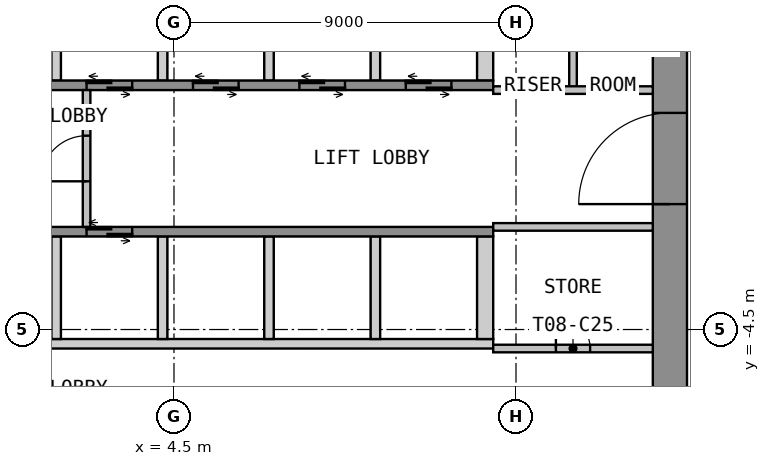
"""IFC4 building model, lengths in metres.
Left out: names, types, materials, properties, quantities, classifications, styles, units other than length and angle.
Written with IfcOpenShell. Run it as: python <this file> out.ifc"""

import sys

from ifc_helpers import new_model, si_unit, direction, frame, frame_2d, origin, place, context, subcontext, project, spatial, polyline, rectangle, outline, extrude, element, fill, save


model = new_model("IFC4")
c1 = context("Model", 3, precision=1e-05, world=origin(), true_north=direction((0.0, 1.0)))
c2 = subcontext(c1, "Body", "Model", "MODEL_VIEW")
j1 = project(units=[si_unit("LENGTHUNIT", "METRE"), si_unit("PLANEANGLEUNIT", "RADIAN")], contexts=[c1])
p1 = place(None, origin())
s1 = spatial("IfcSite", under=j1, at=p1, CompositionType="ELEMENT")
p2 = place(p1, origin())
s2 = spatial("IfcBuilding", under=s1, at=p2, CompositionType="ELEMENT")
p3 = place(p2, frame((0.0, 0.0, 116.4)))
s3 = spatial("IfcBuildingStorey", under=s2, at=p3, CompositionType="ELEMENT", Elevation=116.4)
p4 = place(p3, frame((17.55, -12.6, 0.0), z_axis=(0.0, 0.0, 1.0), x_axis=(0.0, 1.0, 0.0)))
e1 = element("IfcWall", 1, at=p4, inside=s3, PredefinedType="SHEAR", context=c2, shape_type="SweptSolid", body=[
    extrude(rectangle(XDim=25.2, YDim=0.9, at=frame_2d((12.6, 0.0))), origin(), (0.0, 0.0, 1.0), 3.525),
])
p5 = place(p4, frame((11.4, 0.0, 0.0)))
e2 = element("IfcOpeningElement", 2, at=p5, cuts=e1, PredefinedType="OPENING", context=c2, shape_type="SweptSolid", body=[
    extrude(rectangle(XDim=2.4, YDim=2.1, at=frame_2d((1.2, 1.05))), frame((0.0, 0.46, 0.0), z_axis=(0.0, -1.0, 0.0), x_axis=(1.0, 0.0, 0.0)), (0.0, 0.0, 1.0), 0.92),
])
p6 = place(p3, origin())
e3 = element("IfcWall", 3, at=p6, inside=s3, PredefinedType="SHEAR", context=c2, shape_type="SweptSolid", body=[
    extrude(outline(polyline([(1.275, 2.05), (1.525, 2.05), (1.525, 4.75), (1.275, 4.75), (1.275, 2.05)])), origin(), (0.0, 0.0, 1.0), 3.525),
])
p7 = place(p3, origin())
e4 = element("IfcWall", 4, at=p7, inside=s3, PredefinedType="SHEAR", context=c2, shape_type="SweptSolid", body=[
    extrude(outline(polyline([(4.075, 2.05), (4.325, 2.05), (4.325, 4.75), (4.075, 4.75), (4.075, 2.05)])), origin(), (0.0, 0.0, 1.0), 3.525),
])
p8 = place(p3, origin())
e5 = element("IfcWall", 5, at=p8, inside=s3, PredefinedType="SHEAR", context=c2, shape_type="SweptSolid", body=[
    extrude(outline(polyline([(6.875, 2.05), (7.125, 2.05), (7.125, 4.75), (6.875, 4.75), (6.875, 2.05)])), origin(), (0.0, 0.0, 1.0), 3.525),
])
p9 = place(p3, origin())
e6 = element("IfcWall", 6, at=p9, inside=s3, PredefinedType="SHEAR", context=c2, shape_type="SweptSolid", body=[
    extrude(outline(polyline([(9.675, 2.05), (9.925, 2.05), (9.925, 4.75), (9.675, 4.75), (9.675, 2.05)])), origin(), (0.0, 0.0, 1.0), 3.525),
])
p10 = place(p3, origin())
e7 = element("IfcWall", 7, at=p10, inside=s3, PredefinedType="SHEAR", context=c2, shape_type="SweptSolid", body=[
    extrude(outline(polyline([(12.475, 2.05), (12.9, 2.05), (12.9, 4.75), (12.475, 4.75), (12.475, 2.05)])), origin(), (0.0, 0.0, 1.0), 3.525),
])
p11 = place(p3, frame((-12.9, 1.925, 0.0), z_axis=(0.0, 0.0, 1.0), x_axis=(1.0, 0.0, 0.0)))
e8 = element("IfcWall", 8, at=p11, inside=s3, PredefinedType="SHEAR", context=c2, shape_type="SweptSolid", body=[
    extrude(rectangle(XDim=25.8, YDim=0.25, at=frame_2d((12.9, 0.0))), origin(), (0.0, 0.0, 1.0), 3.525),
])
p12 = place(p11, frame((9.5, 0.0, 0.0)))
e9 = element("IfcOpeningElement", 9, at=p12, cuts=e8, PredefinedType="OPENING", context=c2, shape_type="SweptSolid", body=[
    extrude(rectangle(XDim=1.2, YDim=2.1, at=frame_2d((0.6, 1.05))), frame((0.0, 0.135, 0.0), z_axis=(0.0, -1.0, 0.0), x_axis=(1.0, 0.0, 0.0)), (0.0, 0.0, 1.0), 0.27),
])
p13 = place(p11, frame((12.3, 0.0, 0.0)))
e10 = element("IfcOpeningElement", 10, at=p13, cuts=e8, PredefinedType="OPENING", context=c2, shape_type="SweptSolid", body=[
    extrude(rectangle(XDim=1.2, YDim=2.1, at=frame_2d((0.6, 1.05))), frame((0.0, 0.135, 0.0), z_axis=(0.0, -1.0, 0.0), x_axis=(1.0, 0.0, 0.0)), (0.0, 0.0, 1.0), 0.27),
])
p14 = place(p11, frame((15.1, 0.0, 0.0)))
e11 = element("IfcOpeningElement", 11, at=p14, cuts=e8, PredefinedType="OPENING", context=c2, shape_type="SweptSolid", body=[
    extrude(rectangle(XDim=1.2, YDim=2.1, at=frame_2d((0.6, 1.05))), frame((0.0, 0.135, 0.0), z_axis=(0.0, -1.0, 0.0), x_axis=(1.0, 0.0, 0.0)), (0.0, 0.0, 1.0), 0.27),
])
p15 = place(p11, frame((17.9, 0.0, 0.0)))
e12 = element("IfcOpeningElement", 12, at=p15, cuts=e8, PredefinedType="OPENING", context=c2, shape_type="SweptSolid", body=[
    extrude(rectangle(XDim=1.2, YDim=2.1, at=frame_2d((0.6, 1.05))), frame((0.0, 0.135, 0.0), z_axis=(0.0, -1.0, 0.0), x_axis=(1.0, 0.0, 0.0)), (0.0, 0.0, 1.0), 0.27),
])
p16 = place(p11, frame((20.7, 0.0, 0.0)))
e13 = element("IfcOpeningElement", 13, at=p16, cuts=e8, PredefinedType="OPENING", context=c2, shape_type="SweptSolid", body=[
    extrude(rectangle(XDim=1.2, YDim=2.1, at=frame_2d((0.6, 1.05))), frame((0.0, 0.135, 0.0), z_axis=(0.0, -1.0, 0.0), x_axis=(1.0, 0.0, 0.0)), (0.0, 0.0, 1.0), 0.27),
])
p17 = place(p11, frame((23.5, 0.0, 0.0)))
e14 = element("IfcOpeningElement", 14, at=p17, cuts=e8, PredefinedType="OPENING", context=c2, shape_type="SweptSolid", body=[
    extrude(rectangle(XDim=1.2, YDim=2.1, at=frame_2d((0.6, 1.05))), frame((0.0, 0.135, 0.0), z_axis=(0.0, -1.0, 0.0), x_axis=(1.0, 0.0, 0.0)), (0.0, 0.0, 1.0), 0.27),
])
p18 = place(p3, origin())
e15 = element("IfcWall", 15, at=p18, inside=s3, PredefinedType="SHEAR", context=c2, shape_type="SweptSolid", body=[
    extrude(outline(polyline([(-12.9, -5.0), (12.9, -5.0), (12.9, -4.75), (-12.9, -4.75), (-12.9, -5.0)])), origin(), (0.0, 0.0, 1.0), 3.525),
])
p19 = place(p3, origin())
e16 = element("IfcWall", 16, at=p19, inside=s3, PredefinedType="SHEAR", context=c2, shape_type="SweptSolid", body=[
    extrude(outline(polyline([(1.275, -4.75), (1.525, -4.75), (1.525, -2.05), (1.275, -2.05), (1.275, -4.75)])), origin(), (0.0, 0.0, 1.0), 3.525),
])
p20 = place(p3, origin())
e17 = element("IfcWall", 17, at=p20, inside=s3, PredefinedType="SHEAR", context=c2, shape_type="SweptSolid", body=[
    extrude(outline(polyline([(4.075, -4.75), (4.325, -4.75), (4.325, -2.05), (4.075, -2.05), (4.075, -4.75)])), origin(), (0.0, 0.0, 1.0), 3.525),
])
p21 = place(p3, origin())
e18 = element("IfcWall", 18, at=p21, inside=s3, PredefinedType="SHEAR", context=c2, shape_type="SweptSolid", body=[
    extrude(outline(polyline([(6.875, -4.75), (7.125, -4.75), (7.125, -2.05), (6.875, -2.05), (6.875, -4.75)])), origin(), (0.0, 0.0, 1.0), 3.525),
])
p22 = place(p3, origin())
e19 = element("IfcWall", 19, at=p22, inside=s3, PredefinedType="SHEAR", context=c2, shape_type="SweptSolid", body=[
    extrude(outline(polyline([(9.675, -4.75), (9.925, -4.75), (9.925, -2.05), (9.675, -2.05), (9.675, -4.75)])), origin(), (0.0, 0.0, 1.0), 3.525),
])
p23 = place(p3, origin())
e20 = element("IfcWall", 20, at=p23, inside=s3, PredefinedType="SHEAR", context=c2, shape_type="SweptSolid", body=[
    extrude(outline(polyline([(12.475, -4.75), (12.9, -4.75), (12.9, -2.05), (12.475, -2.05), (12.475, -4.75)])), origin(), (0.0, 0.0, 1.0), 3.525),
])
p24 = place(p3, frame((-12.9, -1.925, 0.0), z_axis=(0.0, 0.0, 1.0), x_axis=(1.0, 0.0, 0.0)))
e21 = element("IfcWall", 21, at=p24, inside=s3, PredefinedType="SHEAR", context=c2, shape_type="SweptSolid", body=[
    extrude(rectangle(XDim=25.8, YDim=0.25, at=frame_2d((12.9, 0.0))), origin(), (0.0, 0.0, 1.0), 3.525),
])
p25 = place(p24, frame((1.1, 0.0, 0.0)))
e22 = element("IfcOpeningElement", 22, at=p25, cuts=e21, PredefinedType="OPENING", context=c2, shape_type="SweptSolid", body=[
    extrude(rectangle(XDim=1.2, YDim=2.1, at=frame_2d((0.6, 1.05))), frame((0.0, 0.135, 0.0), z_axis=(0.0, -1.0, 0.0), x_axis=(1.0, 0.0, 0.0)), (0.0, 0.0, 1.0), 0.27),
])
p26 = place(p24, frame((3.9, 0.0, 0.0)))
e23 = element("IfcOpeningElement", 23, at=p26, cuts=e21, PredefinedType="OPENING", context=c2, shape_type="SweptSolid", body=[
    extrude(rectangle(XDim=1.2, YDim=2.1, at=frame_2d((0.6, 1.05))), frame((0.0, 0.135, 0.0), z_axis=(0.0, -1.0, 0.0), x_axis=(1.0, 0.0, 0.0)), (0.0, 0.0, 1.0), 0.27),
])
p27 = place(p24, frame((6.7, 0.0, 0.0)))
e24 = element("IfcOpeningElement", 24, at=p27, cuts=e21, PredefinedType="OPENING", context=c2, shape_type="SweptSolid", body=[
    extrude(rectangle(XDim=1.2, YDim=2.1, at=frame_2d((0.6, 1.05))), frame((0.0, 0.135, 0.0), z_axis=(0.0, -1.0, 0.0), x_axis=(1.0, 0.0, 0.0)), (0.0, 0.0, 1.0), 0.27),
])
p28 = place(p24, frame((9.5, 0.0, 0.0)))
e25 = element("IfcOpeningElement", 25, at=p28, cuts=e21, PredefinedType="OPENING", context=c2, shape_type="SweptSolid", body=[
    extrude(rectangle(XDim=1.2, YDim=2.1, at=frame_2d((0.6, 1.05))), frame((0.0, 0.135, 0.0), z_axis=(0.0, -1.0, 0.0), x_axis=(1.0, 0.0, 0.0)), (0.0, 0.0, 1.0), 0.27),
])
p29 = place(p24, frame((12.3, 0.0, 0.0)))
e26 = element("IfcOpeningElement", 26, at=p29, cuts=e21, PredefinedType="OPENING", context=c2, shape_type="SweptSolid", body=[
    extrude(rectangle(XDim=1.2, YDim=2.1, at=frame_2d((0.6, 1.05))), frame((0.0, 0.135, 0.0), z_axis=(0.0, -1.0, 0.0), x_axis=(1.0, 0.0, 0.0)), (0.0, 0.0, 1.0), 0.27),
])
p30 = place(p24, frame((15.1, 0.0, 0.0)))
e27 = element("IfcOpeningElement", 27, at=p30, cuts=e21, PredefinedType="OPENING", context=c2, shape_type="SweptSolid", body=[
    extrude(rectangle(XDim=1.2, YDim=2.1, at=frame_2d((0.6, 1.05))), frame((0.0, 0.135, 0.0), z_axis=(0.0, -1.0, 0.0), x_axis=(1.0, 0.0, 0.0)), (0.0, 0.0, 1.0), 0.27),
])
p31 = place(p3, frame((2.2, -1.8, 0.0), z_axis=(0.0, 0.0, 1.0), x_axis=(0.0, 1.0, 0.0)))
e28 = element("IfcWall", 28, at=p31, inside=s3, PredefinedType="PARTITIONING", context=c2, shape_type="SweptSolid", body=[
    extrude(rectangle(XDim=3.6, YDim=0.2, at=frame_2d((1.8, 0.0))), origin(), (0.0, 0.0, 1.0), 3.525),
])
p32 = place(p31, frame((1.2, 0.0, 0.0)))
e29 = element("IfcOpeningElement", 29, at=p32, cuts=e28, PredefinedType="OPENING", context=c2, shape_type="SweptSolid", body=[
    extrude(rectangle(XDim=1.2, YDim=2.1, at=frame_2d((0.6, 1.05))), frame((0.0, 0.11, 0.0), z_axis=(0.0, -1.0, 0.0), x_axis=(1.0, 0.0, 0.0)), (0.0, 0.0, 1.0), 0.22),
])
p33 = place(p3, frame((15.0, 1.8, 0.0), z_axis=(0.0, 0.0, 1.0), x_axis=(0.0, 1.0, 0.0)))
e30 = element("IfcWall", 30, at=p33, inside=s3, PredefinedType="PARTITIONING", context=c2, shape_type="SweptSolid", body=[
    extrude(rectangle(XDim=3.2, YDim=0.2, at=frame_2d((1.6, 0.0))), origin(), (0.0, 0.0, 1.0), 3.525),
])
p34 = place(p3, frame((12.9, 1.8, 0.0), z_axis=(0.0, 0.0, 1.0), x_axis=(1.0, 0.0, 0.0)))
e31 = element("IfcWall", 31, at=p34, inside=s3, PredefinedType="PARTITIONING", context=c2, shape_type="SweptSolid", body=[
    extrude(rectangle(XDim=4.2, YDim=0.2, at=frame_2d((2.1, 0.0))), origin(), (0.0, 0.0, 1.0), 3.525),
])
p35 = place(p3, frame((12.9, -5.0, 0.0), z_axis=(0.0, 0.0, 1.0), x_axis=(1.0, 0.0, 0.0)))
e32 = element("IfcWall", 32, at=p35, inside=s3, PredefinedType="PARTITIONING", context=c2, shape_type="SweptSolid", body=[
    extrude(rectangle(XDim=4.2, YDim=0.2, at=frame_2d((2.1, 0.0))), origin(), (0.0, 0.0, 1.0), 3.525),
])
p36 = place(p35, frame((1.65, 0.0, 0.0)))
e33 = element("IfcOpeningElement", 33, at=p36, cuts=e32, PredefinedType="OPENING", context=c2, shape_type="SweptSolid", body=[
    extrude(rectangle(XDim=0.9, YDim=2.1, at=frame_2d((0.45, 1.05))), frame((0.0, 0.11, 0.0), z_axis=(0.0, -1.0, 0.0), x_axis=(1.0, 0.0, 0.0)), (0.0, 0.0, 1.0), 0.22),
])
p37 = place(p3, frame((12.9, -1.8, 0.0), z_axis=(0.0, 0.0, 1.0), x_axis=(1.0, 0.0, 0.0)))
e34 = element("IfcWall", 34, at=p37, inside=s3, PredefinedType="PARTITIONING", context=c2, shape_type="SweptSolid", body=[
    extrude(rectangle(XDim=4.2, YDim=0.2, at=frame_2d((2.1, 0.0))), origin(), (0.0, 0.0, 1.0), 3.525),
])
p38 = place(p5, origin())
e35 = element("IfcDoor", 35, at=p38, inside=s3, OperationType="DOUBLE_DOOR_DOUBLE_SWING", PredefinedType="DOOR", context=c2, shape_type="SweptSolid", body=[
    extrude(rectangle(XDim=2.4, YDim=2.1, at=frame_2d((1.2, 1.05))), frame((0.0, 0.025, 0.0), z_axis=(0.0, -1.0, 0.0), x_axis=(1.0, 0.0, 0.0)), (0.0, 0.0, 1.0), 0.05),
])
fill(e2, e35)
p39 = place(p14, origin())
e36 = element("IfcDoor", 36, at=p39, inside=s3, OperationType="DOUBLE_DOOR_SLIDING", PredefinedType="DOOR", context=c2, shape_type="SweptSolid", body=[
    extrude(rectangle(XDim=1.2, YDim=2.1, at=frame_2d((0.6, 1.05))), frame((0.0, 0.025, 0.0), z_axis=(0.0, -1.0, 0.0), x_axis=(1.0, 0.0, 0.0)), (0.0, 0.0, 1.0), 0.05),
])
fill(e11, e36)
p40 = place(p15, origin())
e37 = element("IfcDoor", 37, at=p40, inside=s3, OperationType="DOUBLE_DOOR_SLIDING", PredefinedType="DOOR", context=c2, shape_type="SweptSolid", body=[
    extrude(rectangle(XDim=1.2, YDim=2.1, at=frame_2d((0.6, 1.05))), frame((0.0, 0.025, 0.0), z_axis=(0.0, -1.0, 0.0), x_axis=(1.0, 0.0, 0.0)), (0.0, 0.0, 1.0), 0.05),
])
fill(e12, e37)
p41 = place(p16, origin())
e38 = element("IfcDoor", 38, at=p41, inside=s3, OperationType="DOUBLE_DOOR_SLIDING", PredefinedType="DOOR", context=c2, shape_type="SweptSolid", body=[
    extrude(rectangle(XDim=1.2, YDim=2.1, at=frame_2d((0.6, 1.05))), frame((0.0, 0.025, 0.0), z_axis=(0.0, -1.0, 0.0), x_axis=(1.0, 0.0, 0.0)), (0.0, 0.0, 1.0), 0.05),
])
fill(e13, e38)
p42 = place(p17, origin())
e39 = element("IfcDoor", 39, at=p42, inside=s3, OperationType="DOUBLE_DOOR_SLIDING", PredefinedType="DOOR", context=c2, shape_type="SweptSolid", body=[
    extrude(rectangle(XDim=1.2, YDim=2.1, at=frame_2d((0.6, 1.05))), frame((0.0, 0.025, 0.0), z_axis=(0.0, -1.0, 0.0), x_axis=(1.0, 0.0, 0.0)), (0.0, 0.0, 1.0), 0.05),
])
fill(e14, e39)
p43 = place(p30, origin())
e40 = element("IfcDoor", 40, at=p43, inside=s3, OperationType="DOUBLE_DOOR_SLIDING", PredefinedType="DOOR", context=c2, shape_type="SweptSolid", body=[
    extrude(rectangle(XDim=1.2, YDim=2.1, at=frame_2d((0.6, 1.05))), frame((0.0, 0.025, 0.0), z_axis=(0.0, -1.0, 0.0), x_axis=(1.0, 0.0, 0.0)), (0.0, 0.0, 1.0), 0.05),
])
fill(e27, e40)
p44 = place(p32, origin())
e41 = element("IfcDoor", 41, at=p44, inside=s3, OperationType="SINGLE_SWING_LEFT", PredefinedType="DOOR", context=c2, shape_type="SweptSolid", body=[
    extrude(rectangle(XDim=1.2, YDim=2.1, at=frame_2d((0.6, 1.05))), frame((0.0, 0.025, 0.0), z_axis=(0.0, -1.0, 0.0), x_axis=(1.0, 0.0, 0.0)), (0.0, 0.0, 1.0), 0.05),
])
fill(e29, e41)
p45 = place(p36, origin())
e42 = element("IfcDoor", 42, at=p45, inside=s3, OperationType="SINGLE_SWING_LEFT", PredefinedType="DOOR", context=c2, shape_type="SweptSolid", body=[
    extrude(rectangle(XDim=0.9, YDim=2.1, at=frame_2d((0.45, 1.05))), frame((0.0, 0.025, 0.0), z_axis=(0.0, -1.0, 0.0), x_axis=(1.0, 0.0, 0.0)), (0.0, 0.0, 1.0), 0.05),
])
fill(e33, e42)
save(model, sys.argv[1])
